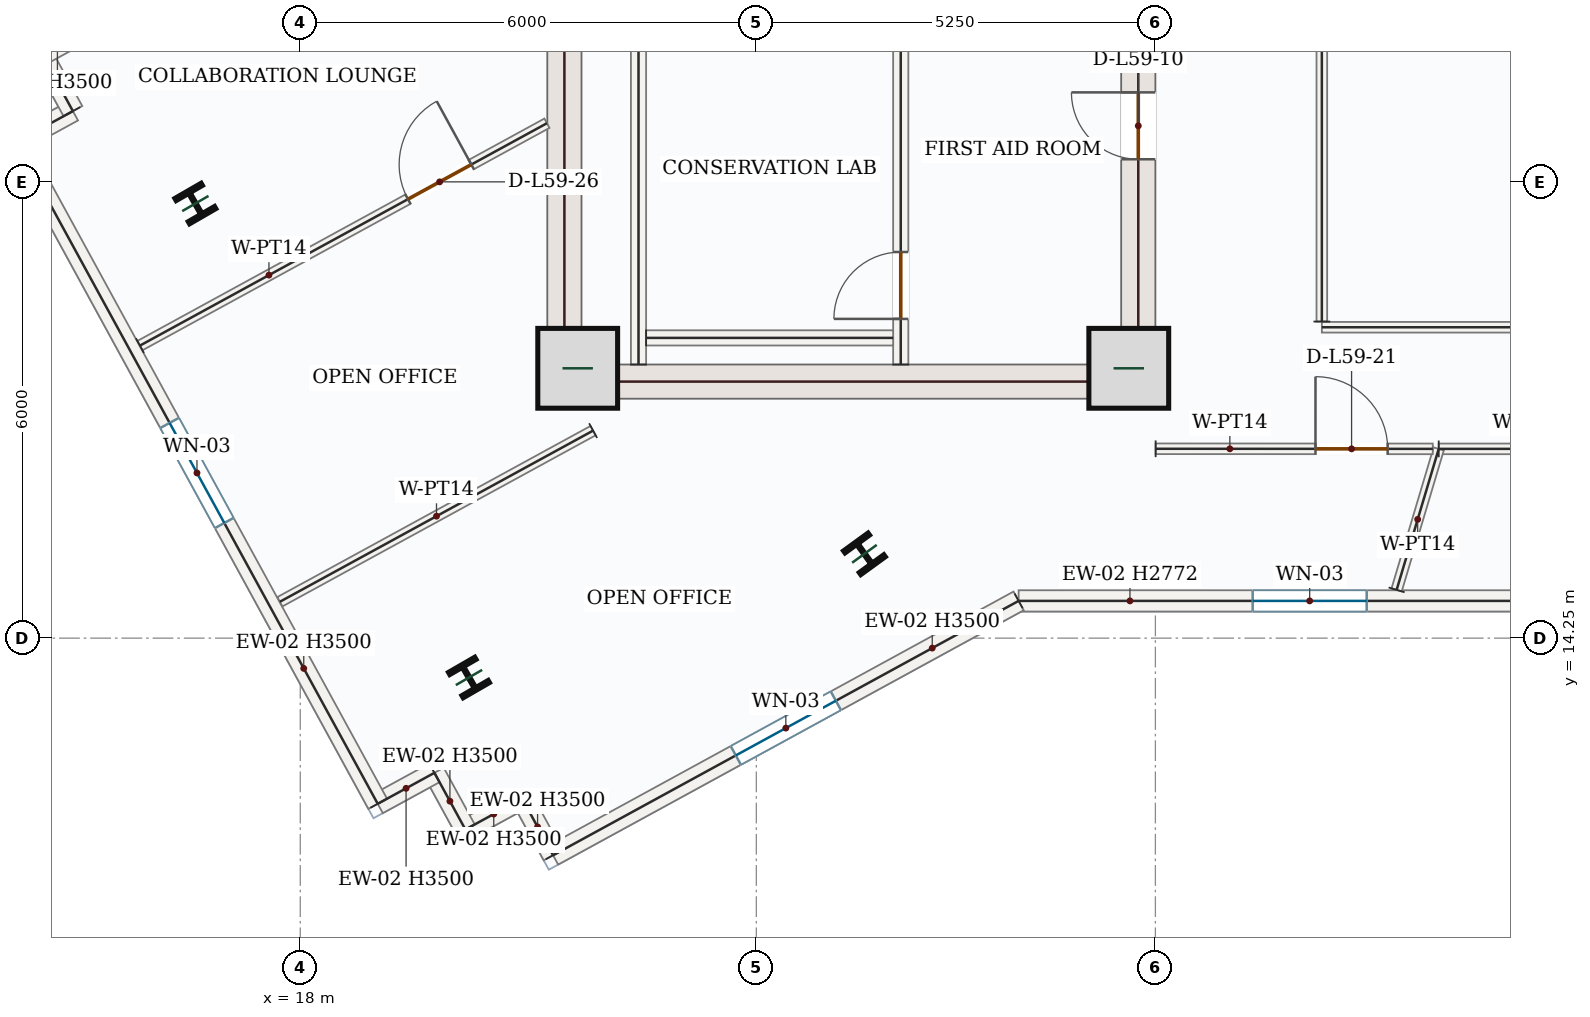
"""IFC4 building model, lengths in metres.
Left out: names, types, materials, properties, quantities, classifications, styles, units other than length and angle.
Written with IfcOpenShell. Run it as: python <this file> out.ifc"""

import sys

from ifc_helpers import new_model, si_unit, direction, frame, frame_2d, origin, origin_2d, place, context, subcontext, project, spatial, rectangle, i_section, extrude, source, transform, mapped, element, fill, save


model = new_model("IFC4")
c1 = context("Model", 3, precision=1e-05, world=origin(), true_north=direction((0.0, 1.0)))
c2 = subcontext(c1, "Body", "Model", "MODEL_VIEW")
j1 = project(units=[si_unit("LENGTHUNIT", "METRE"), si_unit("PLANEANGLEUNIT", "RADIAN")], contexts=[c1])
p1 = place(None, origin())
s1 = spatial("IfcSite", under=j1, at=p1, CompositionType="ELEMENT")
p2 = place(p1, origin())
s2 = spatial("IfcBuilding", under=s1, at=p2, CompositionType="ELEMENT")
p3 = place(p2, frame((0.0, 0.0, 250.35)))
s3 = spatial("IfcBuildingStorey", under=s2, at=p3, CompositionType="ELEMENT", Elevation=250.35)
m1 = source(origin(), c2, "Body", "SweptSolid", [
    extrude(rectangle(XDim=8.55, YDim=0.45, at=frame_2d((4.275, 0.0))), origin(), (0.0, 0.0, 1.0), 3.5),
])
p4 = place(p3, frame((21.475, 17.4, 0.0), z_axis=(0.0, 0.0, 1.0), x_axis=(0.0, 1.0, 0.0)))
e1 = element("IfcWall", 1, at=p4, inside=s3, PredefinedType="SHEAR", context=c2, shape_type="MappedRepresentation", body=[
    mapped(m1, transform((0.0, 0.0, 0.0), x_axis=(1.0, 0.0, 0.0), y_axis=(0.0, 1.0, 0.0), z_axis=(0.0, 0.0, 1.0), scale=1.0)),
])
p5 = place(p3, frame((29.025, 17.4, 0.0), z_axis=(0.0, 0.0, 1.0), x_axis=(0.0, 1.0, 0.0)))
e2 = element("IfcWall", 2, at=p5, inside=s3, PredefinedType="SHEAR", context=c2, shape_type="SweptSolid", body=[
    extrude(rectangle(XDim=8.55, YDim=0.45, at=frame_2d((4.275, 0.0))), origin(), (0.0, 0.0, 1.0), 3.5),
])
p6 = place(p5, frame((6.65, 0.0, 0.0)))
e3 = element("IfcOpeningElement", 3, at=p6, cuts=e2, PredefinedType="OPENING", context=c2, shape_type="SweptSolid", body=[
    extrude(rectangle(XDim=1.1, YDim=2.2, at=frame_2d((0.55, 1.1))), frame((0.0, 0.235, 0.0), z_axis=(0.0, -1.0, 0.0), x_axis=(1.0, 0.0, 0.0)), (0.0, 0.0, 1.0), 0.47),
])
p7 = place(p5, frame((3.15, 0.0, 0.0)))
e4 = element("IfcOpeningElement", 4, at=p7, cuts=e2, PredefinedType="OPENING", context=c2, shape_type="SweptSolid", body=[
    extrude(rectangle(XDim=0.88, YDim=2.1, at=frame_2d((0.44, 1.05))), frame((0.0, 0.235, 0.0), z_axis=(0.0, -1.0, 0.0), x_axis=(1.0, 0.0, 0.0)), (0.0, 0.0, 1.0), 0.47),
])
m2 = source(origin(), c2, "Body", "SweptSolid", [
    extrude(rectangle(XDim=7.1, YDim=0.45, at=frame_2d((3.55, 0.0))), origin(), (0.0, 0.0, 1.0), 3.5),
])
p8 = place(p3, frame((21.7, 17.625, 0.0), z_axis=(0.0, 0.0, 1.0), x_axis=(1.0, 0.0, 0.0)))
e5 = element("IfcWall", 5, at=p8, inside=s3, PredefinedType="SHEAR", context=c2, shape_type="MappedRepresentation", body=[
    mapped(m2, transform((0.0, 0.0, 0.0), x_axis=(1.0, 0.0, 0.0), y_axis=(0.0, 1.0, 0.0), z_axis=(0.0, 0.0, 1.0), scale=1.0)),
])
m3 = source(origin(), c2, "Body", "SweptSolid", [
    extrude(rectangle(XDim=1.05, YDim=1.05, at=origin_2d()), origin(), (0.0, 0.0, 1.0), 3.75),
])
for number, where, z_axis, x_axis in (
    (6, (21.65, 17.8, 0.0), (0.0, 0.0, 1.0), (1.0, 0.0, 0.0)),
    (7, (28.9, 17.8, 0.0), (0.0, 0.0, 1.0), (1.0, 0.0, 0.0)),
):
    element("IfcColumn", number, at=place(p3, frame(where, z_axis=z_axis, x_axis=x_axis)), inside=s3, PredefinedType="COLUMN", context=c2, shape_type="MappedRepresentation", body=[
        mapped(m3, transform((0.0, 0.0, 0.0), x_axis=(1.0, 0.0, 0.0), y_axis=(0.0, 1.0, 0.0), z_axis=(0.0, 0.0, 1.0), scale=1.0)),
    ])
m4 = source(origin(), c2, "Body", "SweptSolid", [
    extrude(i_section(OverallWidth=0.399, OverallDepth=0.386, WebThickness=0.021, FlangeThickness=0.033, FilletRadius=0.018, at=origin_2d()), origin(), (0.0, 0.0, 1.0), 3.75),
])
for number, where, z_axis, x_axis in (
    (8, (25.422, 15.359, 0.0), (0.0, 0.0, 1.0), (0.809, 0.588, 0.0)),
    (9, (16.62, 19.968, 0.0), (0.0, 0.0, 1.0), (0.866, 0.5, 0.0)),
    (10, (20.22, 13.732, 0.0), (0.0, 0.0, 1.0), (0.866, 0.5, 0.0)),
):
    element("IfcColumn", number, at=place(p3, frame(where, z_axis=z_axis, x_axis=x_axis)), inside=s3, PredefinedType="COLUMN", context=c2, shape_type="MappedRepresentation", body=[
        mapped(m4, transform((0.0, 0.0, 0.0), x_axis=(1.0, 0.0, 0.0), y_axis=(0.0, 1.0, 0.0), z_axis=(0.0, 0.0, 1.0), scale=1.0)),
    ])
p9 = place(p3, frame((35.109, 14.74, 0.0), z_axis=(0.0, 0.0, 1.0), x_axis=(-1.0, 0.0, 0.0)))
e11 = element("IfcWall", 11, at=p9, inside=s3, PredefinedType="SOLIDWALL", context=c2, shape_type="SweptSolid", body=[
    extrude(rectangle(XDim=7.658, YDim=0.28, at=frame_2d((3.829, 0.0))), origin(), (0.0, 0.0, 1.0), 2.772),
])
p10 = place(p9, frame((3.079, 0.0, 0.85)))
e12 = element("IfcOpeningElement", 12, at=p10, cuts=e11, PredefinedType="OPENING", context=c2, shape_type="SweptSolid", body=[
    extrude(rectangle(XDim=1.5, YDim=1.5, at=frame_2d((0.75, 0.75))), frame((0.0, 0.15, 0.0), z_axis=(0.0, -1.0, 0.0), x_axis=(1.0, 0.0, 0.0)), (0.0, 0.0, 1.0), 0.3),
])
p11 = place(p3, frame((27.451, 14.74, 0.0), z_axis=(0.0, 0.0, 1.0), x_axis=(-0.877569176667, -0.479450039279, 0.0)))
e13 = element("IfcWall", 13, at=p11, inside=s3, PredefinedType="SOLIDWALL", context=c2, shape_type="SweptSolid", body=[
    extrude(rectangle(XDim=6.979, YDim=0.28, at=frame_2d((3.49, 0.0))), origin(), (0.0, 0.0, 1.0), 3.5),
])
p12 = place(p11, frame((2.74, 0.0, 0.85)))
e14 = element("IfcOpeningElement", 14, at=p12, cuts=e13, PredefinedType="OPENING", context=c2, shape_type="SweptSolid", body=[
    extrude(rectangle(XDim=1.5, YDim=1.5, at=frame_2d((0.75, 0.75))), frame((0.0, 0.15, 0.0), z_axis=(0.0, -1.0, 0.0), x_axis=(1.0, 0.0, 0.0)), (0.0, 0.0, 1.0), 0.3),
])
m5 = source(origin(), c2, "Body", "SweptSolid", [
    extrude(rectangle(XDim=0.85, YDim=0.28, at=frame_2d((0.425, 0.0))), origin(), (0.0, 0.0, 1.0), 3.5),
])
for number, where, z_axis, x_axis in (
    (15, (21.326, 11.394, 0.0), (0.0, 0.0, 1.0), (-0.479, 0.878, 0.0)),
    (16, (20.918, 12.14, 0.0), (0.0, 0.0, 1.0), (-0.878, -0.479, 0.0)),
):
    element("IfcWall", number, at=place(p3, frame(where, z_axis=z_axis, x_axis=x_axis)), inside=s3, PredefinedType="SOLIDWALL", context=c2, shape_type="MappedRepresentation", body=[
        mapped(m5, transform((0.0, 0.0, 0.0), x_axis=(1.0, 0.0, 0.0), y_axis=(0.0, 1.0, 0.0), z_axis=(0.0, 0.0, 1.0), scale=1.0)),
    ])
m6 = source(origin(), c2, "Body", "SweptSolid", [
    extrude(rectangle(XDim=0.85, YDim=0.28, at=frame_2d((0.425, 0.0))), origin(), (0.0, 0.0, 1.0), 3.5),
])
p13 = place(p3, frame((20.173, 11.732, 0.0), z_axis=(0.0, 0.0, 1.0), x_axis=(-0.479656876283, 0.877456141943, 0.0)))
e17 = element("IfcWall", 17, at=p13, inside=s3, PredefinedType="SOLIDWALL", context=c2, shape_type="MappedRepresentation", body=[
    mapped(m6, transform((0.0, 0.0, 0.0), x_axis=(1.0, 0.0, 0.0), y_axis=(0.0, 1.0, 0.0), z_axis=(0.0, 0.0, 1.0), scale=1.0)),
])
p14 = place(p3, frame((19.765, 12.478, 0.0), z_axis=(0.0, 0.0, 1.0), x_axis=(-0.877577015132, -0.479435691737, 0.0)))
e18 = element("IfcWall", 18, at=p14, inside=s3, PredefinedType="SOLIDWALL", context=c2, shape_type="MappedRepresentation", body=[
    mapped(m5, transform((0.0, 0.0, 0.0), x_axis=(1.0, 0.0, 0.0), y_axis=(0.0, 1.0, 0.0), z_axis=(0.0, 0.0, 1.0), scale=1.0)),
])
p15 = place(p3, frame((19.019, 12.071, 0.0), z_axis=(0.0, 0.0, 1.0), x_axis=(-0.479472774144, 0.877556755347, 0.0)))
e19 = element("IfcWall", 19, at=p15, inside=s3, PredefinedType="SOLIDWALL", context=c2, shape_type="SweptSolid", body=[
    extrude(rectangle(XDim=9.92, YDim=0.28, at=frame_2d((4.96, 0.0))), origin(), (0.0, 0.0, 1.0), 3.5),
])
p16 = place(p15, frame((4.21, 0.0, 0.85)))
e20 = element("IfcOpeningElement", 20, at=p16, cuts=e19, PredefinedType="OPENING", context=c2, shape_type="SweptSolid", body=[
    extrude(rectangle(XDim=1.5, YDim=1.5, at=frame_2d((0.75, 0.75))), frame((0.0, 0.15, 0.0), z_axis=(0.0, -1.0, 0.0), x_axis=(1.0, 0.0, 0.0)), (0.0, 0.0, 1.0), 0.3),
])
m7 = source(origin(), c2, "Body", "SweptSolid", [
    extrude(rectangle(XDim=0.85, YDim=0.28, at=frame_2d((0.425, 0.0))), origin(), (0.0, 0.0, 1.0), 3.5),
])
p17 = place(p3, frame((14.263, 20.776, 0.0), z_axis=(0.0, 0.0, 1.0), x_axis=(0.87752219781, 0.479536017782, 0.0)))
e21 = element("IfcWall", 21, at=p17, inside=s3, PredefinedType="SOLIDWALL", context=c2, shape_type="MappedRepresentation", body=[
    mapped(m7, transform((0.0, 0.0, 0.0), x_axis=(1.0, 0.0, 0.0), y_axis=(0.0, 1.0, 0.0), z_axis=(0.0, 0.0, 1.0), scale=1.0)),
])
for number, where, z_axis, x_axis in (
    (22, (15.009, 21.184, 0.0), (0.0, 0.0, 1.0), (-0.479, 0.878, 0.0)),
    (23, (14.601, 21.929, 0.0), (0.0, 0.0, 1.0), (0.878, 0.479, 0.0)),
):
    element("IfcWall", number, at=place(p3, frame(where, z_axis=z_axis, x_axis=x_axis)), inside=s3, PredefinedType="SOLIDWALL", context=c2, shape_type="MappedRepresentation", body=[
        mapped(m5, transform((0.0, 0.0, 0.0), x_axis=(1.0, 0.0, 0.0), y_axis=(0.0, 1.0, 0.0), z_axis=(0.0, 0.0, 1.0), scale=1.0)),
    ])
m8 = source(origin(), c2, "Body", "SweptSolid", [
    extrude(rectangle(XDim=7.87, YDim=0.2, at=frame_2d((3.935, 0.0))), origin(), (0.0, 0.0, 1.0), 3.5),
])
p18 = place(p3, frame((22.45, 17.85, 0.0), z_axis=(0.0, 0.0, 1.0), x_axis=(0.0, 1.0, 0.0)))
e24 = element("IfcWall", 24, at=p18, inside=s3, PredefinedType="SOLIDWALL", context=c2, shape_type="MappedRepresentation", body=[
    mapped(m8, transform((0.0, 0.0, 0.0), x_axis=(1.0, 0.0, 0.0), y_axis=(0.0, 1.0, 0.0), z_axis=(0.0, 0.0, 1.0), scale=1.0)),
])
p19 = place(p3, frame((25.9, 17.85, 0.0), z_axis=(0.0, 0.0, 1.0), x_axis=(0.0, 1.0, 0.0)))
e25 = element("IfcWall", 25, at=p19, inside=s3, PredefinedType="SOLIDWALL", context=c2, shape_type="SweptSolid", body=[
    extrude(rectangle(XDim=8.0, YDim=0.2, at=frame_2d((4.0, 0.0))), origin(), (0.0, 0.0, 1.0), 3.5),
])
p20 = place(p19, frame((6.2, 0.0, 0.0)))
e26 = element("IfcOpeningElement", 26, at=p20, cuts=e25, PredefinedType="OPENING", context=c2, shape_type="SweptSolid", body=[
    extrude(rectangle(XDim=1.0, YDim=2.15, at=frame_2d((0.5, 1.075))), frame((0.0, 0.11, 0.0), z_axis=(0.0, -1.0, 0.0), x_axis=(1.0, 0.0, 0.0)), (0.0, 0.0, 1.0), 0.22),
])
p21 = place(p19, frame((0.6, 0.0, 0.0)))
e27 = element("IfcOpeningElement", 27, at=p21, cuts=e25, PredefinedType="OPENING", context=c2, shape_type="SweptSolid", body=[
    extrude(rectangle(XDim=0.88, YDim=2.1, at=frame_2d((0.44, 1.05))), frame((0.0, 0.11, 0.0), z_axis=(0.0, -1.0, 0.0), x_axis=(1.0, 0.0, 0.0)), (0.0, 0.0, 1.0), 0.22),
])
m9 = source(origin(), c2, "Body", "SweptSolid", [
    extrude(rectangle(XDim=3.25, YDim=0.2, at=frame_2d((1.625, 0.0))), origin(), (0.0, 0.0, 1.0), 3.5),
])
p22 = place(p3, frame((22.55, 18.2, 0.0), z_axis=(0.0, 0.0, 1.0), x_axis=(1.0, 0.0, 0.0)))
e28 = element("IfcWall", 28, at=p22, inside=s3, PredefinedType="SOLIDWALL", context=c2, shape_type="MappedRepresentation", body=[
    mapped(m9, transform((0.0, 0.0, 0.0), x_axis=(1.0, 0.0, 0.0), y_axis=(0.0, 1.0, 0.0), z_axis=(0.0, 0.0, 1.0), scale=1.0)),
])
m10 = source(origin(), c2, "Body", "SweptSolid", [
    extrude(rectangle(XDim=4.695, YDim=0.14, at=frame_2d((2.348, 0.0))), origin(), (0.0, 0.0, 1.0), 3.5),
])
p23 = place(p3, frame((21.852, 16.98, 0.0), z_axis=(0.0, 0.0, 1.0), x_axis=(-0.877559526902, -0.479467701461, 0.0)))
e29 = element("IfcWall", 29, at=p23, inside=s3, PredefinedType="PARTITIONING", context=c2, shape_type="MappedRepresentation", body=[
    mapped(m10, transform((0.0, 0.0, 0.0), x_axis=(1.0, 0.0, 0.0), y_axis=(0.0, 1.0, 0.0), z_axis=(0.0, 0.0, 1.0), scale=1.0)),
])
p24 = place(p3, frame((15.891, 18.099, 0.0), z_axis=(0.0, 0.0, 1.0), x_axis=(0.877574248726, 0.479440755436, 0.0)))
e30 = element("IfcWall", 30, at=p24, inside=s3, PredefinedType="PARTITIONING", context=c2, shape_type="SweptSolid", body=[
    extrude(rectangle(XDim=6.102, YDim=0.14, at=frame_2d((3.051, 0.0))), origin(), (0.0, 0.0, 1.0), 3.5),
])
p25 = place(p24, frame((4.018, 0.0, 0.0)))
e31 = element("IfcOpeningElement", 31, at=p25, cuts=e30, PredefinedType="OPENING", context=c2, shape_type="SweptSolid", body=[
    extrude(rectangle(XDim=0.95, YDim=2.15, at=frame_2d((0.475, 1.075))), frame((0.0, 0.08, 0.0), z_axis=(0.0, -1.0, 0.0), x_axis=(1.0, 0.0, 0.0)), (0.0, 0.0, 1.0), 0.16),
])
p26 = place(p3, frame((32.978, 16.74, 0.0), z_axis=(0.0, 0.0, 1.0), x_axis=(1.0, 0.0, 0.0)))
e32 = element("IfcWall", 32, at=p26, inside=s3, PredefinedType="PARTITIONING", context=c2, shape_type="SweptSolid", body=[
    extrude(rectangle(XDim=4.879, YDim=0.14, at=frame_2d((2.439, 0.0))), origin(), (0.0, 0.0, 1.0), 3.5),
])
p27 = place(p26, frame((2.554, 0.0, 0.0)))
e33 = element("IfcOpeningElement", 33, at=p27, cuts=e32, PredefinedType="OPENING", context=c2, shape_type="SweptSolid", body=[
    extrude(rectangle(XDim=0.95, YDim=2.15, at=frame_2d((0.475, 1.075))), frame((0.0, 0.08, 0.0), z_axis=(0.0, -1.0, 0.0), x_axis=(1.0, 0.0, 0.0)), (0.0, 0.0, 1.0), 0.16),
])
m11 = source(origin(), c2, "Body", "SweptSolid", [
    extrude(rectangle(XDim=1.936, YDim=0.14, at=frame_2d((0.968, 0.0))), origin(), (0.0, 0.0, 1.0), 3.5),
])
p28 = place(p3, frame((32.424, 14.885, 0.0), z_axis=(0.0, 0.0, 1.0), x_axis=(0.286028613148, 0.958221077028, 0.0)))
e34 = element("IfcWall", 34, at=p28, inside=s3, PredefinedType="PARTITIONING", context=c2, shape_type="MappedRepresentation", body=[
    mapped(m11, transform((0.0, 0.0, 0.0), x_axis=(1.0, 0.0, 0.0), y_axis=(0.0, 1.0, 0.0), z_axis=(0.0, 0.0, 1.0), scale=1.0)),
])
p29 = place(p3, frame((29.253, 16.741, 0.0), z_axis=(0.0, 0.0, 1.0), x_axis=(0.999999943952, -0.000334806463, 0.0)))
e35 = element("IfcWall", 35, at=p29, inside=s3, PredefinedType="PARTITIONING", context=c2, shape_type="SweptSolid", body=[
    extrude(rectangle(XDim=3.646, YDim=0.14, at=frame_2d((1.823, 0.0))), origin(), (0.0, 0.0, 1.0), 3.5),
])
p30 = place(p29, frame((2.103, 0.0, 0.0)))
e36 = element("IfcOpeningElement", 36, at=p30, cuts=e35, PredefinedType="OPENING", context=c2, shape_type="SweptSolid", body=[
    extrude(rectangle(XDim=0.95, YDim=2.15, at=frame_2d((0.475, 1.075))), frame((0.0, 0.08, 0.0), z_axis=(0.0, -1.0, 0.0), x_axis=(1.0, 0.0, 0.0)), (0.0, 0.0, 1.0), 0.16),
])
m12 = source(origin(), c2, "Body", "SweptSolid", [
    extrude(rectangle(XDim=9.12, YDim=0.14, at=frame_2d((4.56, 0.0))), origin(), (0.0, 0.0, 1.0), 3.5),
])
p31 = place(p3, frame((40.56, 18.34, 0.0), z_axis=(0.0, 0.0, 1.0), x_axis=(-1.0, 0.0, 0.0)))
e37 = element("IfcWall", 37, at=p31, inside=s3, PredefinedType="PARTITIONING", context=c2, shape_type="MappedRepresentation", body=[
    mapped(m12, transform((0.0, 0.0, 0.0), x_axis=(1.0, 0.0, 0.0), y_axis=(0.0, 1.0, 0.0), z_axis=(0.0, 0.0, 1.0), scale=1.0)),
])
m13 = source(origin(), c2, "Body", "SweptSolid", [
    extrude(rectangle(XDim=7.395, YDim=0.14, at=frame_2d((3.698, 0.0))), origin(), (0.0, 0.0, 1.0), 3.5),
])
p32 = place(p3, frame((31.44, 18.415, 0.0), z_axis=(0.0, 0.0, 1.0), x_axis=(0.0, 1.0, 0.0)))
e38 = element("IfcWall", 38, at=p32, inside=s3, PredefinedType="PARTITIONING", context=c2, shape_type="MappedRepresentation", body=[
    mapped(m13, transform((0.0, 0.0, 0.0), x_axis=(1.0, 0.0, 0.0), y_axis=(0.0, 1.0, 0.0), z_axis=(0.0, 0.0, 1.0), scale=1.0)),
])
m14 = source(origin(), c2, "Body", "SweptSolid", [
    extrude(rectangle(XDim=1.5, YDim=1.5, at=frame_2d((0.75, 0.75))), frame((0.0, 0.03, 0.0), z_axis=(0.0, -1.0, 0.0), x_axis=(1.0, 0.0, 0.0)), (0.0, 0.0, 1.0), 0.06),
])
p33 = place(p10, origin())
e39 = element("IfcWindow", 39, at=p33, inside=s3, PartitioningType="SINGLE_PANEL", PredefinedType="WINDOW", context=c2, shape_type="MappedRepresentation", body=[
    mapped(m14, transform((0.0, 0.0, 0.0), x_axis=(1.0, 0.0, 0.0), y_axis=(0.0, 1.0, 0.0), z_axis=(0.0, 0.0, 1.0), scale=1.0)),
])
fill(e12, e39)
p34 = place(p12, origin())
e40 = element("IfcWindow", 40, at=p34, inside=s3, PartitioningType="SINGLE_PANEL", PredefinedType="WINDOW", context=c2, shape_type="MappedRepresentation", body=[
    mapped(m14, transform((0.0, 0.0, 0.0), x_axis=(1.0, 0.0, 0.0), y_axis=(0.0, 1.0, 0.0), z_axis=(0.0, 0.0, 1.0), scale=1.0)),
])
fill(e14, e40)
p35 = place(p16, origin())
e41 = element("IfcWindow", 41, at=p35, inside=s3, PartitioningType="SINGLE_PANEL", PredefinedType="WINDOW", context=c2, shape_type="MappedRepresentation", body=[
    mapped(m14, transform((0.0, 0.0, 0.0), x_axis=(1.0, 0.0, 0.0), y_axis=(0.0, 1.0, 0.0), z_axis=(0.0, 0.0, 1.0), scale=1.0)),
])
fill(e20, e41)
m15 = source(origin(), c2, "Body", "SweptSolid", [
    extrude(rectangle(XDim=0.88, YDim=2.1, at=frame_2d((0.44, 1.05))), frame((0.0, 0.025, 0.0), z_axis=(0.0, -1.0, 0.0), x_axis=(1.0, 0.0, 0.0)), (0.0, 0.0, 1.0), 0.05),
])
p36 = place(p21, origin())
e42 = element("IfcDoor", 42, at=p36, inside=s3, OperationType="SINGLE_SWING_LEFT", PredefinedType="DOOR", context=c2, shape_type="MappedRepresentation", body=[
    mapped(m15, transform((0.0, 0.0, 0.0), x_axis=(1.0, 0.0, 0.0), y_axis=(0.0, 1.0, 0.0), z_axis=(0.0, 0.0, 1.0), scale=1.0)),
])
fill(e27, e42)
p37 = place(p7, origin())
e43 = element("IfcDoor", 43, at=p37, inside=s3, OperationType="SINGLE_SWING_RIGHT", PredefinedType="DOOR", context=c2, shape_type="MappedRepresentation", body=[
    mapped(m15, transform((0.0, 0.0, 0.0), x_axis=(1.0, 0.0, 0.0), y_axis=(0.0, 1.0, 0.0), z_axis=(0.0, 0.0, 1.0), scale=1.0)),
])
fill(e4, e43)
m16 = source(origin(), c2, "Body", "SweptSolid", [
    extrude(rectangle(XDim=0.95, YDim=2.15, at=frame_2d((0.475, 1.075))), frame((0.0, 0.025, 0.0), z_axis=(0.0, -1.0, 0.0), x_axis=(1.0, 0.0, 0.0)), (0.0, 0.0, 1.0), 0.05),
])
p38 = place(p30, origin())
e44 = element("IfcDoor", 44, at=p38, inside=s3, OperationType="SINGLE_SWING_LEFT", PredefinedType="DOOR", context=c2, shape_type="MappedRepresentation", body=[
    mapped(m16, transform((0.0, 0.0, 0.0), x_axis=(1.0, 0.0, 0.0), y_axis=(0.0, 1.0, 0.0), z_axis=(0.0, 0.0, 1.0), scale=1.0)),
])
fill(e36, e44)
p39 = place(p25, origin())
e45 = element("IfcDoor", 45, at=p39, inside=s3, OperationType="SINGLE_SWING_RIGHT", PredefinedType="DOOR", context=c2, shape_type="MappedRepresentation", body=[
    mapped(m16, transform((0.0, 0.0, 0.0), x_axis=(1.0, 0.0, 0.0), y_axis=(0.0, 1.0, 0.0), z_axis=(0.0, 0.0, 1.0), scale=1.0)),
])
fill(e31, e45)
save(model, sys.argv[1])
